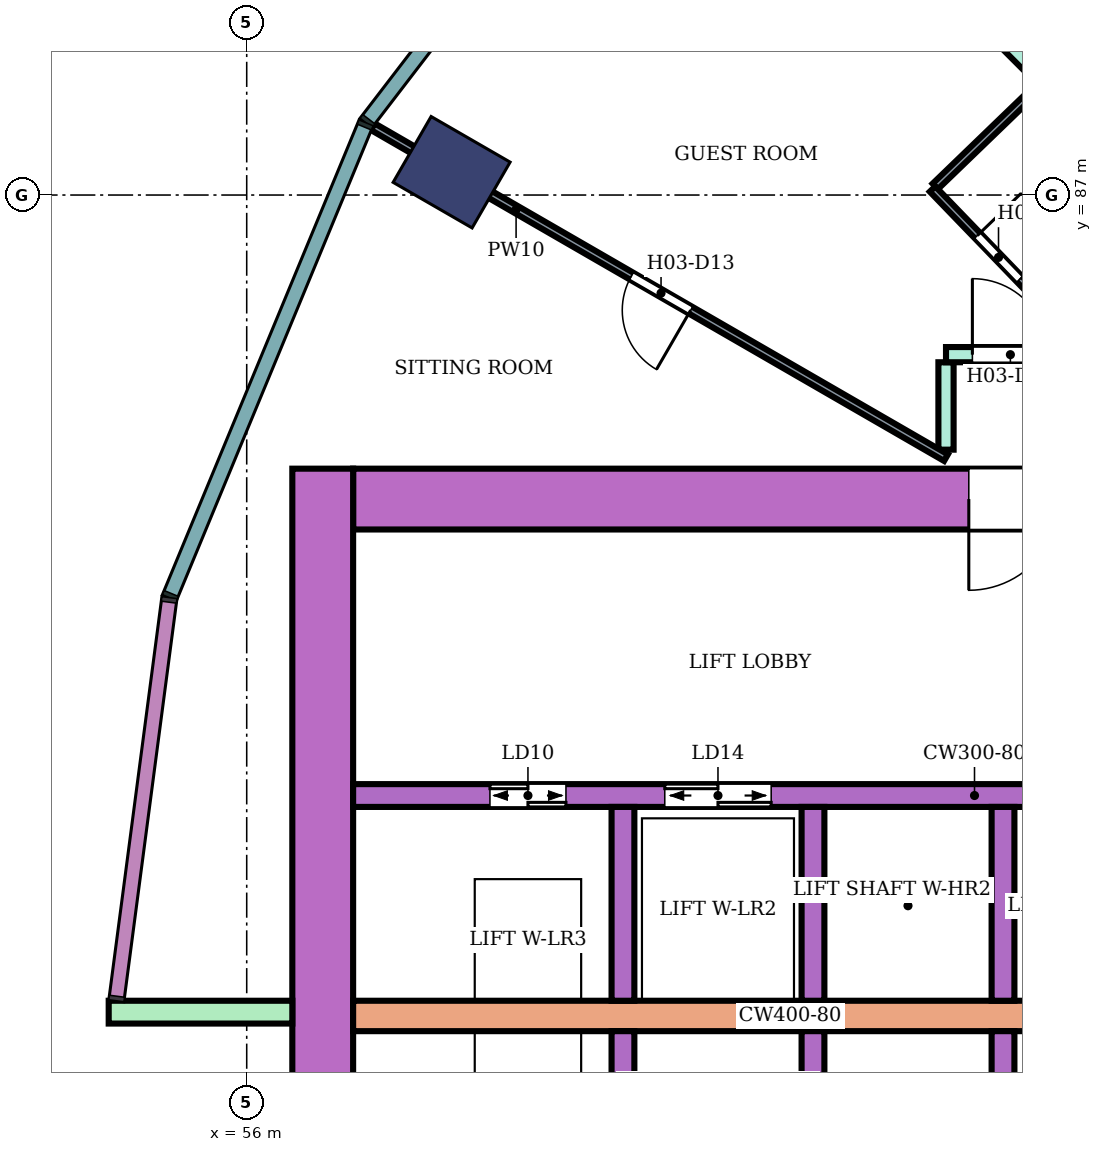
"""IFC4 building model, lengths in metres.
Left out: names, types, materials, properties, quantities, classifications, styles, units other than length and angle.
Written with IfcOpenShell. Run it as: python <this file> out.ifc"""

import sys

from ifc_helpers import new_model, si_unit, direction, frame, frame_2d, origin, origin_2d, place, context, subcontext, project, spatial, rectangle, extrude, element, fill, save


model = new_model("IFC4")
c1 = context("Model", 3, precision=1e-05, world=origin(), true_north=direction((0.0, 1.0)))
c2 = subcontext(c1, "Body", "Model", "MODEL_VIEW")
j1 = project(units=[si_unit("LENGTHUNIT", "METRE"), si_unit("PLANEANGLEUNIT", "RADIAN")], contexts=[c1])
p1 = place(None, origin())
s1 = spatial("IfcSite", under=j1, at=p1, CompositionType="ELEMENT")
p2 = place(p1, origin())
s2 = spatial("IfcBuilding", under=s1, at=p2, CompositionType="ELEMENT")
p3 = place(p2, frame((0.0, 0.0, 55.4)))
s3 = spatial("IfcBuildingStorey", under=s2, at=p3, CompositionType="ELEMENT", Elevation=55.4)
p4 = place(p3, frame((58.696, 87.3, 0.0), z_axis=(0.0, 0.0, 1.0), x_axis=(-0.866025403784, 0.5, 0.0)))
e1 = element("IfcColumn", 1, at=p4, inside=s3, PredefinedType="COLUMN", context=c2, shape_type="SweptSolid", body=[
    extrude(rectangle(XDim=1.2, YDim=1.0, at=origin_2d()), origin(), (0.0, 0.0, 1.0), 3.8),
])
p5 = place(p3, frame((72.1, 83.0, 0.0), z_axis=(0.0, 0.0, 1.0), x_axis=(-1.0, 0.0, 0.0)))
e2 = element("IfcWall", 2, at=p5, inside=s3, PredefinedType="SHEAR", context=c2, shape_type="SweptSolid", body=[
    extrude(rectangle(XDim=14.7, YDim=0.8, at=frame_2d((7.35, 0.0))), origin(), (0.0, 0.0, 1.0), 3.48),
])
p6 = place(p5, frame((4.2, 0.0, 0.0)))
e3 = element("IfcOpeningElement", 3, at=p6, cuts=e2, PredefinedType="OPENING", context=c2, shape_type="SweptSolid", body=[
    extrude(rectangle(XDim=2.4, YDim=2.4, at=frame_2d((1.2, 1.2))), frame((0.0, 0.41, 0.0), z_axis=(0.0, -1.0, 0.0), x_axis=(1.0, 0.0, 0.0)), (0.0, 0.0, 1.0), 0.82),
])
p7 = place(p3, frame((57.0, 83.4, 0.0), z_axis=(0.0, 0.0, 1.0), x_axis=(0.0, -1.0, 0.0)))
e4 = element("IfcWall", 4, at=p7, inside=s3, PredefinedType="SHEAR", context=c2, shape_type="SweptSolid", body=[
    extrude(rectangle(XDim=16.8, YDim=0.8, at=frame_2d((8.4, 0.0))), origin(), (0.0, 0.0, 1.0), 3.48),
])
p8 = place(p3, frame((68.3, 76.2, 0.0), z_axis=(0.0, 0.0, 1.0), x_axis=(-1.0, 0.0, 0.0)))
e5 = element("IfcWall", 5, at=p8, inside=s3, PredefinedType="SHEAR", context=c2, shape_type="SweptSolid", body=[
    extrude(rectangle(XDim=10.9, YDim=0.4, at=frame_2d((5.45, 0.0))), origin(), (0.0, 0.0, 1.0), 3.48),
])
p9 = place(p3, frame((68.3, 79.1, 0.0), z_axis=(0.0, 0.0, 1.0), x_axis=(-1.0, 0.0, 0.0)))
e6 = element("IfcWall", 6, at=p9, inside=s3, PredefinedType="SHEAR", context=c2, shape_type="SweptSolid", body=[
    extrude(rectangle(XDim=10.9, YDim=0.3, at=frame_2d((5.45, 0.0))), origin(), (0.0, 0.0, 1.0), 3.48),
])
p10 = place(p9, frame((0.4, 0.0, 0.0)))
e7 = element("IfcOpeningElement", 7, at=p10, cuts=e6, PredefinedType="OPENING", context=c2, shape_type="SweptSolid", body=[
    extrude(rectangle(XDim=1.4, YDim=2.1, at=frame_2d((0.7, 1.05))), frame((0.0, 0.16, 0.0), z_axis=(0.0, -1.0, 0.0), x_axis=(1.0, 0.0, 0.0)), (0.0, 0.0, 1.0), 0.32),
])
p11 = place(p9, frame((5.4, 0.0, 0.0)))
e8 = element("IfcOpeningElement", 8, at=p11, cuts=e6, PredefinedType="OPENING", context=c2, shape_type="SweptSolid", body=[
    extrude(rectangle(XDim=1.4, YDim=2.1, at=frame_2d((0.7, 1.05))), frame((0.0, 0.16, 0.0), z_axis=(0.0, -1.0, 0.0), x_axis=(1.0, 0.0, 0.0)), (0.0, 0.0, 1.0), 0.32),
])
p12 = place(p9, frame((8.1, 0.0, 0.0)))
e9 = element("IfcOpeningElement", 9, at=p12, cuts=e6, PredefinedType="OPENING", context=c2, shape_type="SweptSolid", body=[
    extrude(rectangle(XDim=1.0, YDim=2.1, at=frame_2d((0.5, 1.05))), frame((0.0, 0.16, 0.0), z_axis=(0.0, -1.0, 0.0), x_axis=(1.0, 0.0, 0.0)), (0.0, 0.0, 1.0), 0.32),
])
for number, where, z_axis, x_axis in (
    (10, (65.95, 76.0, 0.0), (0.0, 0.0, 1.0), (0.0, -1.0, 0.0)),
    (11, (63.45, 76.0, 0.0), (0.0, 0.0, 1.0), (0.0, -1.0, 0.0)),
    (12, (60.95, 76.0, 0.0), (0.0, 0.0, 1.0), (0.0, -1.0, 0.0)),
    (13, (65.95, 78.95, 0.0), (0.0, 0.0, 1.0), (0.0, -1.0, 0.0)),
    (14, (63.45, 78.95, 0.0), (0.0, 0.0, 1.0), (0.0, -1.0, 0.0)),
    (15, (60.95, 78.95, 0.0), (0.0, 0.0, 1.0), (0.0, -1.0, 0.0)),
):
    element("IfcWall", number, at=place(p3, frame(where, z_axis=z_axis, x_axis=x_axis)), inside=s3, PredefinedType="SHEAR", context=c2, shape_type="SweptSolid", body=[
        extrude(rectangle(XDim=2.55, YDim=0.3, at=frame_2d((1.275, 0.0))), origin(), (0.0, 0.0, 1.0), 3.48),
    ])
p13 = place(p3, frame((56.6, 76.25, 0.0), z_axis=(0.0, 0.0, 1.0), x_axis=(-1.0, 0.0, 0.0)))
e16 = element("IfcWall", 16, at=p13, inside=s3, PredefinedType="NOTDEFINED", context=c2, shape_type="SweptSolid", body=[
    extrude(rectangle(XDim=2.416, YDim=0.3, at=frame_2d((1.208, 0.0))), origin(), (0.0, 0.0, 1.0), 3.8),
])
p14 = place(p3, frame((63.598, 91.408, 0.0), z_axis=(0.0, 0.0, 1.0), x_axis=(0.706999146394, -0.707214399597, 0.0)))
e17 = element("IfcWall", 17, at=p14, inside=s3, PredefinedType="PARTITIONING", context=c2, shape_type="SweptSolid", body=[
    extrude(rectangle(XDim=6.805, YDim=0.2, at=frame_2d((3.403, 0.0))), origin(), (0.0, 0.0, 1.0), 3.35),
])
p15 = place(p3, frame((65.2, 83.65, 0.0), z_axis=(0.0, 0.0, 1.0), x_axis=(0.0, 1.0, 0.0)))
e18 = element("IfcWall", 18, at=p15, inside=s3, PredefinedType="PARTITIONING", context=c2, shape_type="SweptSolid", body=[
    extrude(rectangle(XDim=1.15, YDim=0.2, at=frame_2d((0.575, 0.0))), origin(), (0.0, 0.0, 1.0), 3.35),
])
p16 = place(p3, frame((65.2, 84.9, 0.0), z_axis=(0.0, 0.0, 1.0), x_axis=(1.0, 0.0, 0.0)))
e19 = element("IfcWall", 19, at=p16, inside=s3, PredefinedType="PARTITIONING", context=c2, shape_type="SweptSolid", body=[
    extrude(rectangle(XDim=1.537, YDim=0.2, at=frame_2d((0.769, 0.0))), origin(), (0.0, 0.0, 1.0), 3.35),
])
p17 = place(p16, frame((0.347, 0.0, 0.0)))
e20 = element("IfcOpeningElement", 20, at=p17, cuts=e19, PredefinedType="OPENING", context=c2, shape_type="SweptSolid", body=[
    extrude(rectangle(XDim=1.0, YDim=2.1, at=frame_2d((0.5, 1.05))), frame((0.0, 0.11, 0.0), z_axis=(0.0, -1.0, 0.0), x_axis=(1.0, 0.0, 0.0)), (0.0, 0.0, 1.0), 0.22),
])
p18 = place(p3, frame((57.659, 87.899, 0.0), z_axis=(0.0, 0.0, 1.0), x_axis=(0.86602264145, -0.500004784474, 0.0)))
e21 = element("IfcWall", 21, at=p18, inside=s3, PredefinedType="PARTITIONING", context=c2, shape_type="SweptSolid", body=[
    extrude(rectangle(XDim=8.708, YDim=0.1, at=frame_2d((4.354, 0.0))), origin(), (0.0, 0.0, 1.0), 3.35),
])
p19 = place(p18, frame((3.929, 0.0, 0.0)))
e22 = element("IfcOpeningElement", 22, at=p19, cuts=e21, PredefinedType="OPENING", context=c2, shape_type="SweptSolid", body=[
    extrude(rectangle(XDim=0.9, YDim=2.1, at=frame_2d((0.45, 1.05))), frame((0.0, 0.06, 0.0), z_axis=(0.0, -1.0, 0.0), x_axis=(1.0, 0.0, 0.0)), (0.0, 0.0, 1.0), 0.12),
])
p20 = place(p3, frame((65.059, 87.114, 0.0), z_axis=(0.0, 0.0, 1.0), x_axis=(0.719715847356, 0.694268751324, 0.0)))
e23 = element("IfcWall", 23, at=p20, inside=s3, PredefinedType="PARTITIONING", context=c2, shape_type="SweptSolid", body=[
    extrude(rectangle(XDim=1.9, YDim=0.1, at=frame_2d((0.95, 0.0))), origin(), (0.0, 0.0, 1.0), 3.35),
])
p21 = place(p3, frame((65.023, 87.079, 0.0), z_axis=(0.0, 0.0, 1.0), x_axis=(0.694287838235, -0.719697434815, 0.0)))
e24 = element("IfcWall", 24, at=p21, inside=s3, PredefinedType="PARTITIONING", context=c2, shape_type="SweptSolid", body=[
    extrude(rectangle(XDim=2.7, YDim=0.1, at=frame_2d((1.35, 0.0))), origin(), (0.0, 0.0, 1.0), 3.35),
])
p22 = place(p21, frame((0.85, 0.0, 0.0)))
e25 = element("IfcOpeningElement", 25, at=p22, cuts=e24, PredefinedType="OPENING", context=c2, shape_type="SweptSolid", body=[
    extrude(rectangle(XDim=0.8, YDim=2.1, at=frame_2d((0.4, 1.05))), frame((0.0, 0.06, 0.0), z_axis=(0.0, -1.0, 0.0), x_axis=(1.0, 0.0, 0.0)), (0.0, 0.0, 1.0), 0.12),
])
p23 = place(p17, origin())
e26 = element("IfcDoor", 26, at=p23, inside=s3, OperationType="SINGLE_SWING_LEFT", PredefinedType="DOOR", context=c2, shape_type="SweptSolid", body=[
    extrude(rectangle(XDim=1.0, YDim=2.1, at=frame_2d((0.5, 1.05))), frame((0.0, 0.025, 0.0), z_axis=(0.0, -1.0, 0.0), x_axis=(1.0, 0.0, 0.0)), (0.0, 0.0, 1.0), 0.05),
])
fill(e20, e26)
p24 = place(p22, origin())
e27 = element("IfcDoor", 27, at=p24, inside=s3, OperationType="SINGLE_SWING_LEFT", PredefinedType="DOOR", context=c2, shape_type="SweptSolid", body=[
    extrude(rectangle(XDim=0.8, YDim=2.1, at=frame_2d((0.4, 1.05))), frame((0.0, 0.025, 0.0), z_axis=(0.0, -1.0, 0.0), x_axis=(1.0, 0.0, 0.0)), (0.0, 0.0, 1.0), 0.05),
])
fill(e25, e27)
p25 = place(p19, frame((0.9, 0.0, 0.0), z_axis=(0.0, 0.0, 1.0), x_axis=(-1.0, 0.0, 0.0)))
e28 = element("IfcDoor", 28, at=p25, inside=s3, OperationType="SINGLE_SWING_LEFT", PredefinedType="DOOR", context=c2, shape_type="SweptSolid", body=[
    extrude(rectangle(XDim=0.9, YDim=2.1, at=frame_2d((0.45, 1.05))), frame((0.0, 0.025, 0.0), z_axis=(0.0, -1.0, 0.0), x_axis=(1.0, 0.0, 0.0)), (0.0, 0.0, 1.0), 0.05),
])
fill(e22, e28)
p26 = place(p11, origin())
e29 = element("IfcDoor", 29, at=p26, inside=s3, OperationType="DOUBLE_DOOR_SLIDING", PredefinedType="DOOR", context=c2, shape_type="SweptSolid", body=[
    extrude(rectangle(XDim=1.4, YDim=2.1, at=frame_2d((0.7, 1.05))), frame((0.0, 0.025, 0.0), z_axis=(0.0, -1.0, 0.0), x_axis=(1.0, 0.0, 0.0)), (0.0, 0.0, 1.0), 0.05),
])
fill(e8, e29)
p27 = place(p12, origin())
e30 = element("IfcDoor", 30, at=p27, inside=s3, OperationType="DOUBLE_DOOR_SLIDING", PredefinedType="DOOR", context=c2, shape_type="SweptSolid", body=[
    extrude(rectangle(XDim=1.0, YDim=2.1, at=frame_2d((0.5, 1.05))), frame((0.0, 0.025, 0.0), z_axis=(0.0, -1.0, 0.0), x_axis=(1.0, 0.0, 0.0)), (0.0, 0.0, 1.0), 0.05),
])
fill(e9, e30)
p28 = place(p6, origin())
e31 = element("IfcDoor", 31, at=p28, inside=s3, OperationType="DOUBLE_DOOR_SINGLE_SWING", PredefinedType="DOOR", context=c2, shape_type="SweptSolid", body=[
    extrude(rectangle(XDim=2.4, YDim=2.4, at=frame_2d((1.2, 1.2))), frame((0.0, 0.025, 0.0), z_axis=(0.0, -1.0, 0.0), x_axis=(1.0, 0.0, 0.0)), (0.0, 0.0, 1.0), 0.05),
])
fill(e3, e31)
save(model, sys.argv[1])
